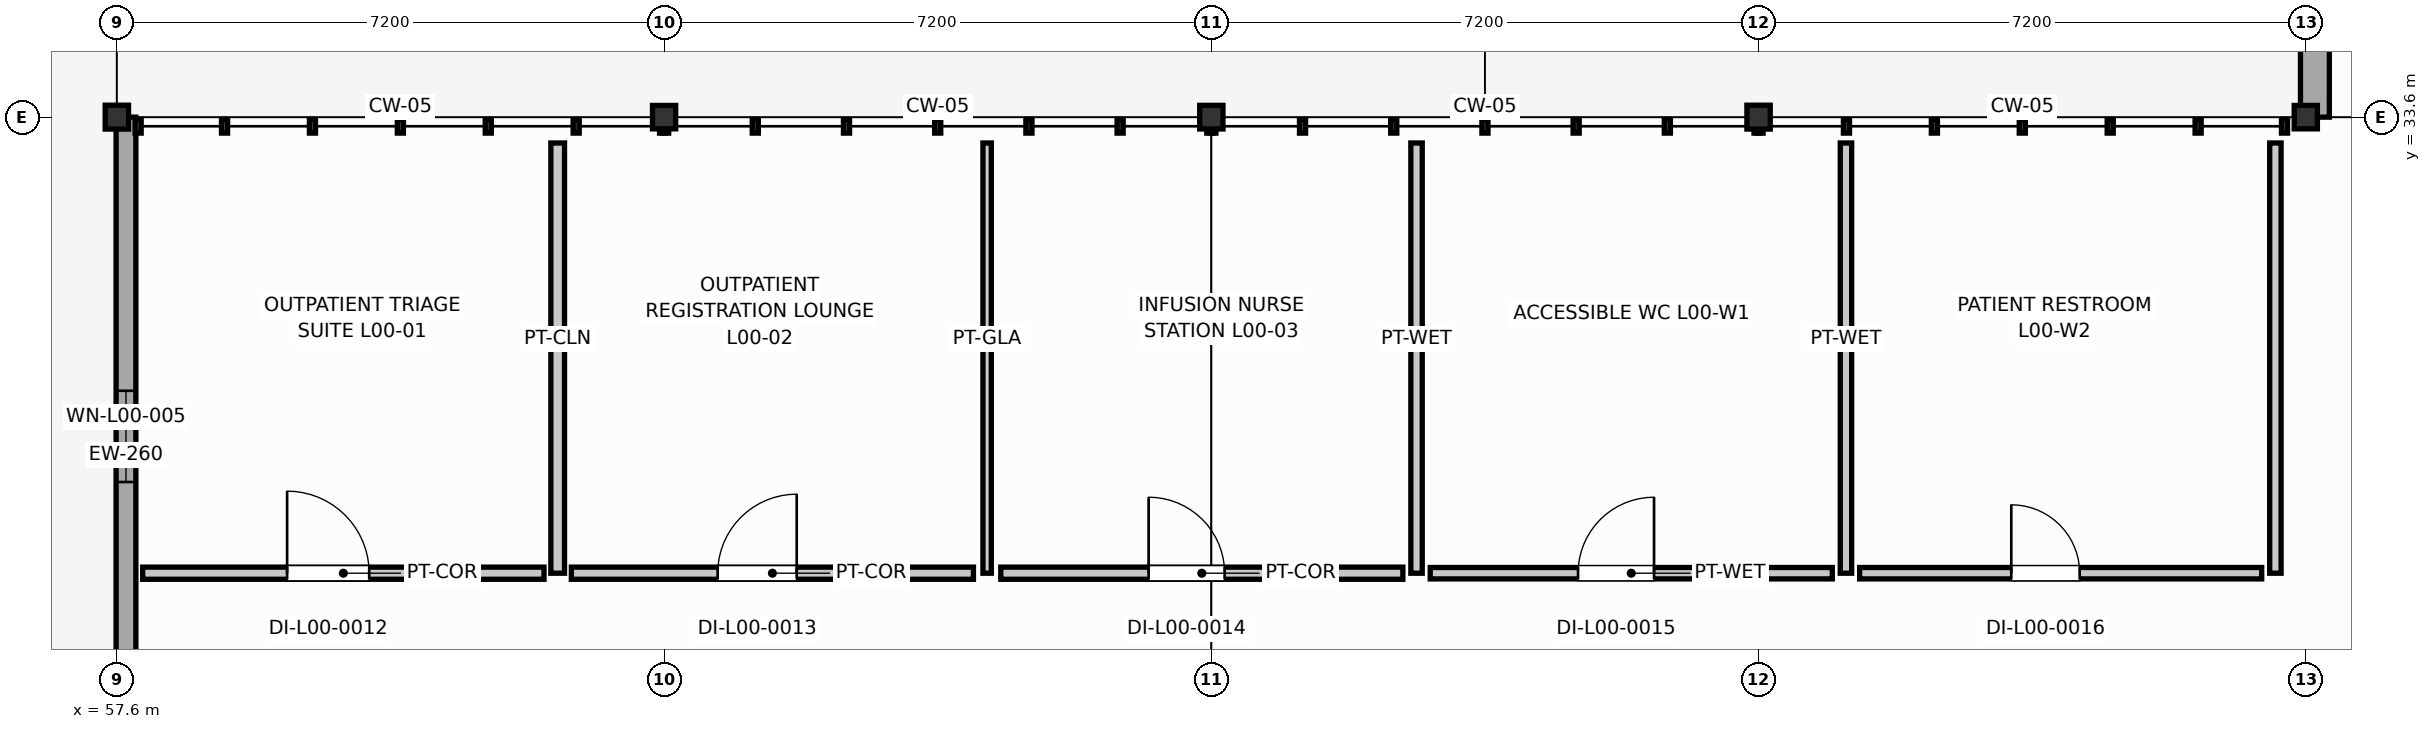
"""IFC4 building model, lengths in metres.
Left out: names, types, materials, properties, quantities, classifications, styles, units other than length and angle.
Written with IfcOpenShell. Run it as: python <this file> out.ifc"""

import sys

from ifc_helpers import new_model, si_unit, direction, frame, frame_2d, origin, origin_2d, place, context, subcontext, project, spatial, rectangle, i_section, extrude, element, fill, save


model = new_model("IFC4")
c1 = context("Model", 3, precision=1e-05, world=origin(), true_north=direction((0.0, 1.0)))
c2 = subcontext(c1, "Body", "Model", "MODEL_VIEW")
j1 = project(units=[si_unit("LENGTHUNIT", "METRE"), si_unit("PLANEANGLEUNIT", "RADIAN")], contexts=[c1])
p1 = place(None, origin())
s1 = spatial("IfcSite", under=j1, at=p1, CompositionType="ELEMENT")
p2 = place(p1, origin())
s2 = spatial("IfcBuilding", under=s1, at=p2, CompositionType="ELEMENT")
p3 = place(p2, origin())
s3 = spatial("IfcBuildingStorey", under=s2, at=p3, CompositionType="ELEMENT", Elevation=0.0)
p4 = place(p3, frame((57.6, 33.6, 0.0), z_axis=(0.0, 0.0, 1.0), x_axis=(1.0, 0.0, 0.0)))
e1 = element("IfcColumn", 1, at=p4, inside=s3, PredefinedType="COLUMN", context=c2, shape_type="SweptSolid", body=[
    extrude(i_section(OverallWidth=0.307, OverallDepth=0.314, WebThickness=0.012, FlangeThickness=0.019, FilletRadius=0.016, at=origin_2d()), origin(), (0.0, 0.0, 1.0), 4.8),
])
p5 = place(p3, frame((64.8, 33.6, 0.0), z_axis=(0.0, 0.0, 1.0), x_axis=(1.0, 0.0, 0.0)))
e2 = element("IfcColumn", 2, at=p5, inside=s3, PredefinedType="COLUMN", context=c2, shape_type="SweptSolid", body=[
    extrude(i_section(OverallWidth=0.305, OverallDepth=0.308, WebThickness=0.01, FlangeThickness=0.015, FilletRadius=0.015, at=origin_2d()), origin(), (0.0, 0.0, 1.0), 4.8),
])
p6 = place(p3, frame((72.0, 33.6, 0.0), z_axis=(0.0, 0.0, 1.0), x_axis=(1.0, 0.0, 0.0)))
e3 = element("IfcColumn", 3, at=p6, inside=s3, PredefinedType="COLUMN", context=c2, shape_type="SweptSolid", body=[
    extrude(i_section(OverallWidth=0.306, OverallDepth=0.311, WebThickness=0.011, FlangeThickness=0.017, FilletRadius=0.015, at=origin_2d()), origin(), (0.0, 0.0, 1.0), 4.8),
])
p7 = place(p3, frame((79.2, 33.6, 0.0), z_axis=(0.0, 0.0, 1.0), x_axis=(1.0, 0.0, 0.0)))
e4 = element("IfcColumn", 4, at=p7, inside=s3, PredefinedType="COLUMN", context=c2, shape_type="SweptSolid", body=[
    extrude(i_section(OverallWidth=0.307, OverallDepth=0.314, WebThickness=0.012, FlangeThickness=0.019, FilletRadius=0.016, at=origin_2d()), origin(), (0.0, 0.0, 1.0), 4.8),
])
p8 = place(p3, frame((86.4, 33.6, 0.0), z_axis=(0.0, 0.0, 1.0), x_axis=(1.0, 0.0, 0.0)))
e5 = element("IfcColumn", 5, at=p8, inside=s3, PredefinedType="COLUMN", context=c2, shape_type="SweptSolid", body=[
    extrude(i_section(OverallWidth=0.305, OverallDepth=0.308, WebThickness=0.01, FlangeThickness=0.015, FilletRadius=0.015, at=origin_2d()), origin(), (0.0, 0.0, 1.0), 4.8),
])
p9 = place(p3, frame((57.72, 25.2, 0.0), z_axis=(0.0, 0.0, 1.0), x_axis=(0.0, 1.0, 0.0)))
e6 = element("IfcWall", 6, at=p9, inside=s3, PredefinedType="SOLIDWALL", context=c2, shape_type="SweptSolid", body=[
    extrude(rectangle(XDim=8.4, YDim=0.26, at=frame_2d((4.2, 0.0))), origin(), (0.0, 0.0, 1.0), 3.998),
])
p10 = place(p9, frame((3.6, 0.0, 0.95)))
e7 = element("IfcOpeningElement", 7, at=p10, cuts=e6, PredefinedType="OPENING", context=c2, shape_type="SweptSolid", body=[
    extrude(rectangle(XDim=1.2, YDim=1.15, at=frame_2d((0.6, 0.575))), frame((0.0, 0.14, 0.0), z_axis=(0.0, -1.0, 0.0), x_axis=(1.0, 0.0, 0.0)), (0.0, 0.0, 1.0), 0.28),
])
p11 = place(p3, frame((86.52, 33.6, 0.0), z_axis=(0.0, 0.0, 1.0), x_axis=(0.0, 1.0, 0.0)))
e8 = element("IfcWall", 8, at=p11, inside=s3, PredefinedType="SOLIDWALL", context=c2, shape_type="SweptSolid", body=[
    extrude(rectangle(XDim=8.4, YDim=0.38, at=frame_2d((4.2, 0.0))), origin(), (0.0, 0.0, 1.0), 3.615),
])
p12 = place(p11, frame((3.6, 0.0, 0.95)))
e9 = element("IfcOpeningElement", 9, at=p12, cuts=e8, PredefinedType="OPENING", context=c2, shape_type="SweptSolid", body=[
    extrude(rectangle(XDim=1.2, YDim=1.35, at=frame_2d((0.6, 0.675))), frame((0.0, 0.2, 0.0), z_axis=(0.0, -1.0, 0.0), x_axis=(1.0, 0.0, 0.0)), (0.0, 0.0, 1.0), 0.4),
])
p13 = place(p3, frame((63.4, 33.26, 0.0), z_axis=(0.0, 0.0, 1.0), x_axis=(0.0, -1.0, 0.0)))
e10 = element("IfcWall", 10, at=p13, inside=s3, PredefinedType="PARTITIONING", context=c2, shape_type="SweptSolid", body=[
    extrude(rectangle(XDim=5.66, YDim=0.18, at=frame_2d((2.83, 0.0))), origin(), (0.0, 0.0, 1.0), 4.545),
])
p14 = place(p3, frame((63.22, 27.6, 0.0), z_axis=(0.0, 0.0, 1.0), x_axis=(-1.0, 0.0, 0.0)))
e11 = element("IfcWall", 11, at=p14, inside=s3, PredefinedType="PARTITIONING", context=c2, shape_type="SweptSolid", body=[
    extrude(rectangle(XDim=5.28, YDim=0.16, at=frame_2d((2.64, 0.0))), origin(), (0.0, 0.0, 1.0), 4.283),
])
p15 = place(p14, frame((2.3, 0.0, 0.0)))
e12 = element("IfcOpeningElement", 12, at=p15, cuts=e11, PredefinedType="OPENING", context=c2, shape_type="SweptSolid", body=[
    extrude(rectangle(XDim=1.08, YDim=2.15, at=frame_2d((0.54, 1.075))), frame((0.0, 0.09, 0.0), z_axis=(0.0, -1.0, 0.0), x_axis=(1.0, 0.0, 0.0)), (0.0, 0.0, 1.0), 0.18),
])
p16 = place(p3, frame((69.05, 33.26, 0.0), z_axis=(0.0, 0.0, 1.0), x_axis=(0.0, -1.0, 0.0)))
e13 = element("IfcWall", 13, at=p16, inside=s3, PredefinedType="MOVABLE", context=c2, shape_type="SweptSolid", body=[
    extrude(rectangle(XDim=5.66, YDim=0.11, at=frame_2d((2.83, 0.0))), origin(), (0.0, 0.0, 1.0), 4.545),
])
p17 = place(p3, frame((68.87, 27.6, 0.0), z_axis=(0.0, 0.0, 1.0), x_axis=(-1.0, 0.0, 0.0)))
e14 = element("IfcWall", 14, at=p17, inside=s3, PredefinedType="PARTITIONING", context=c2, shape_type="SweptSolid", body=[
    extrude(rectangle(XDim=5.29, YDim=0.16, at=frame_2d((2.645, 0.0))), origin(), (0.0, 0.0, 1.0), 4.135),
])
p18 = place(p17, frame((2.325, 0.0, 0.0)))
e15 = element("IfcOpeningElement", 15, at=p18, cuts=e14, PredefinedType="OPENING", context=c2, shape_type="SweptSolid", body=[
    extrude(rectangle(XDim=1.04, YDim=2.15, at=frame_2d((0.52, 1.075))), frame((0.0, 0.09, 0.0), z_axis=(0.0, -1.0, 0.0), x_axis=(1.0, 0.0, 0.0)), (0.0, 0.0, 1.0), 0.18),
])
p19 = place(p3, frame((74.7, 33.26, 0.0), z_axis=(0.0, 0.0, 1.0), x_axis=(0.0, -1.0, 0.0)))
e16 = element("IfcWall", 16, at=p19, inside=s3, PredefinedType="PLUMBINGWALL", context=c2, shape_type="SweptSolid", body=[
    extrude(rectangle(XDim=5.66, YDim=0.15, at=frame_2d((2.83, 0.0))), origin(), (0.0, 0.0, 1.0), 4.545),
])
p20 = place(p3, frame((74.52, 27.6, 0.0), z_axis=(0.0, 0.0, 1.0), x_axis=(-1.0, 0.0, 0.0)))
e17 = element("IfcWall", 17, at=p20, inside=s3, PredefinedType="PARTITIONING", context=c2, shape_type="SweptSolid", body=[
    extrude(rectangle(XDim=5.29, YDim=0.16, at=frame_2d((2.645, 0.0))), origin(), (0.0, 0.0, 1.0), 3.928),
])
p21 = place(p20, frame((2.345, 0.0, 0.0)))
e18 = element("IfcOpeningElement", 18, at=p21, cuts=e17, PredefinedType="OPENING", context=c2, shape_type="SweptSolid", body=[
    extrude(rectangle(XDim=1.0, YDim=2.15, at=frame_2d((0.5, 1.075))), frame((0.0, 0.09, 0.0), z_axis=(0.0, -1.0, 0.0), x_axis=(1.0, 0.0, 0.0)), (0.0, 0.0, 1.0), 0.18),
])
p22 = place(p3, frame((80.35, 33.26, 0.0), z_axis=(0.0, 0.0, 1.0), x_axis=(0.0, -1.0, 0.0)))
e19 = element("IfcWall", 19, at=p22, inside=s3, PredefinedType="PLUMBINGWALL", context=c2, shape_type="SweptSolid", body=[
    extrude(rectangle(XDim=5.66, YDim=0.15, at=frame_2d((2.83, 0.0))), origin(), (0.0, 0.0, 1.0), 4.545),
])
p23 = place(p3, frame((80.17, 27.6, 0.0), z_axis=(0.0, 0.0, 1.0), x_axis=(-1.0, 0.0, 0.0)))
e20 = element("IfcWall", 20, at=p23, inside=s3, PredefinedType="PLUMBINGWALL", context=c2, shape_type="SweptSolid", body=[
    extrude(rectangle(XDim=5.29, YDim=0.15, at=frame_2d((2.645, 0.0))), origin(), (0.0, 0.0, 1.0), 4.085),
])
p24 = place(p23, frame((2.345, 0.0, 0.0)))
e21 = element("IfcOpeningElement", 21, at=p24, cuts=e20, PredefinedType="OPENING", context=c2, shape_type="SweptSolid", body=[
    extrude(rectangle(XDim=1.0, YDim=2.1, at=frame_2d((0.5, 1.05))), frame((0.0, 0.085, 0.0), z_axis=(0.0, -1.0, 0.0), x_axis=(1.0, 0.0, 0.0)), (0.0, 0.0, 1.0), 0.17),
])
p25 = place(p3, frame((86.0, 33.26, 0.0), z_axis=(0.0, 0.0, 1.0), x_axis=(0.0, -1.0, 0.0)))
e22 = element("IfcWall", 22, at=p25, inside=s3, PredefinedType="PLUMBINGWALL", context=c2, shape_type="SweptSolid", body=[
    extrude(rectangle(XDim=5.66, YDim=0.15, at=frame_2d((2.83, 0.0))), origin(), (0.0, 0.0, 1.0), 4.545),
])
p26 = place(p3, frame((85.82, 27.6, 0.0), z_axis=(0.0, 0.0, 1.0), x_axis=(-1.0, 0.0, 0.0)))
e23 = element("IfcWall", 23, at=p26, inside=s3, PredefinedType="PLUMBINGWALL", context=c2, shape_type="SweptSolid", body=[
    extrude(rectangle(XDim=5.29, YDim=0.15, at=frame_2d((2.645, 0.0))), origin(), (0.0, 0.0, 1.0), 4.187),
])
p27 = place(p26, frame((2.395, 0.0, 0.0)))
e24 = element("IfcOpeningElement", 24, at=p27, cuts=e23, PredefinedType="OPENING", context=c2, shape_type="SweptSolid", body=[
    extrude(rectangle(XDim=0.9, YDim=2.1, at=frame_2d((0.45, 1.05))), frame((0.0, 0.085, 0.0), z_axis=(0.0, -1.0, 0.0), x_axis=(1.0, 0.0, 0.0)), (0.0, 0.0, 1.0), 0.17),
])
p28 = place(p10, origin())
e25 = element("IfcWindow", 25, at=p28, inside=s3, PartitioningType="SINGLE_PANEL", PredefinedType="WINDOW", context=c2, shape_type="SweptSolid", body=[
    extrude(rectangle(XDim=1.2, YDim=1.15, at=frame_2d((0.6, 0.575))), frame((0.0, 0.03, 0.0), z_axis=(0.0, -1.0, 0.0), x_axis=(1.0, 0.0, 0.0)), (0.0, 0.0, 1.0), 0.06),
])
fill(e7, e25)
p29 = place(p15, frame((1.08, 0.0, 0.0), z_axis=(0.0, 0.0, 1.0), x_axis=(-1.0, 0.0, 0.0)))
e26 = element("IfcDoor", 26, at=p29, inside=s3, OperationType="SINGLE_SWING_LEFT", PredefinedType="DOOR", context=c2, shape_type="SweptSolid", body=[
    extrude(rectangle(XDim=1.08, YDim=2.15, at=frame_2d((0.54, 1.075))), frame((0.0, 0.025, 0.0), z_axis=(0.0, -1.0, 0.0), x_axis=(1.0, 0.0, 0.0)), (0.0, 0.0, 1.0), 0.05),
])
fill(e12, e26)
p30 = place(p18, frame((1.04, 0.0, 0.0), z_axis=(0.0, 0.0, 1.0), x_axis=(-1.0, 0.0, 0.0)))
e27 = element("IfcDoor", 27, at=p30, inside=s3, OperationType="SINGLE_SWING_RIGHT", PredefinedType="DOOR", context=c2, shape_type="SweptSolid", body=[
    extrude(rectangle(XDim=1.04, YDim=2.15, at=frame_2d((0.52, 1.075))), frame((0.0, 0.025, 0.0), z_axis=(0.0, -1.0, 0.0), x_axis=(1.0, 0.0, 0.0)), (0.0, 0.0, 1.0), 0.05),
])
fill(e15, e27)
p31 = place(p21, frame((1.0, 0.0, 0.0), z_axis=(0.0, 0.0, 1.0), x_axis=(-1.0, 0.0, 0.0)))
e28 = element("IfcDoor", 28, at=p31, inside=s3, OperationType="SINGLE_SWING_LEFT", PredefinedType="DOOR", context=c2, shape_type="SweptSolid", body=[
    extrude(rectangle(XDim=1.0, YDim=2.15, at=frame_2d((0.5, 1.075))), frame((0.0, 0.025, 0.0), z_axis=(0.0, -1.0, 0.0), x_axis=(1.0, 0.0, 0.0)), (0.0, 0.0, 1.0), 0.05),
])
fill(e18, e28)
p32 = place(p24, frame((1.0, 0.0, 0.0), z_axis=(0.0, 0.0, 1.0), x_axis=(-1.0, 0.0, 0.0)))
e29 = element("IfcDoor", 29, at=p32, inside=s3, OperationType="SINGLE_SWING_RIGHT", PredefinedType="DOOR", context=c2, shape_type="SweptSolid", body=[
    extrude(rectangle(XDim=1.0, YDim=2.1, at=frame_2d((0.5, 1.05))), frame((0.0, 0.025, 0.0), z_axis=(0.0, -1.0, 0.0), x_axis=(1.0, 0.0, 0.0)), (0.0, 0.0, 1.0), 0.05),
])
fill(e21, e29)
p33 = place(p27, frame((0.9, 0.0, 0.0), z_axis=(0.0, 0.0, 1.0), x_axis=(-1.0, 0.0, 0.0)))
e30 = element("IfcDoor", 30, at=p33, inside=s3, OperationType="SINGLE_SWING_LEFT", PredefinedType="DOOR", context=c2, shape_type="SweptSolid", body=[
    extrude(rectangle(XDim=0.9, YDim=2.1, at=frame_2d((0.45, 1.05))), frame((0.0, 0.025, 0.0), z_axis=(0.0, -1.0, 0.0), x_axis=(1.0, 0.0, 0.0)), (0.0, 0.0, 1.0), 0.05),
])
fill(e24, e30)
save(model, sys.argv[1])
